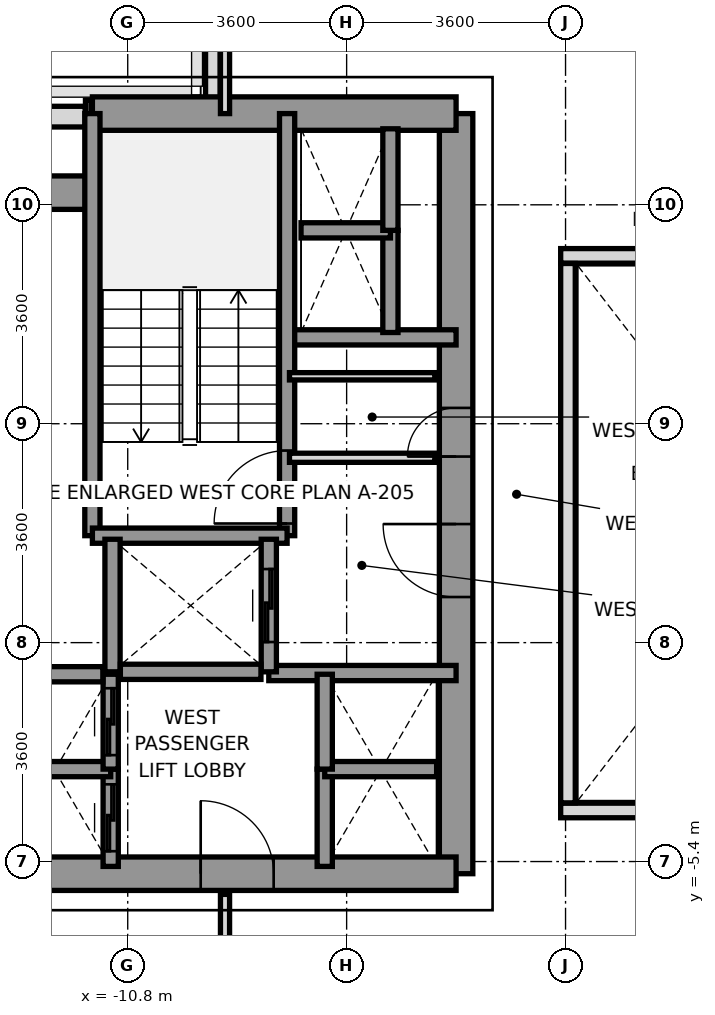
"""IFC4 building model, lengths in metres.
Left out: names, types, materials, properties, quantities, classifications, styles, units other than length and angle.
Written with IfcOpenShell. Run it as: python <this file> out.ifc"""

import sys

from ifc_helpers import new_model, si_unit, direction, frame, frame_2d, origin, place, context, subcontext, project, spatial, rectangle, extrude, source, transform, mapped, element, fill, save


model = new_model("IFC4")
c1 = context("Model", 3, precision=1e-05, world=origin(), true_north=direction((0.0, 1.0)))
c2 = subcontext(c1, "Body", "Model", "MODEL_VIEW")
j1 = project(units=[si_unit("LENGTHUNIT", "METRE"), si_unit("PLANEANGLEUNIT", "RADIAN")], contexts=[c1])
p1 = place(None, origin())
s1 = spatial("IfcSite", under=j1, at=p1, CompositionType="ELEMENT")
p2 = place(p1, origin())
s2 = spatial("IfcBuilding", under=s1, at=p2, CompositionType="ELEMENT")
p3 = place(p2, frame((0.0, 0.0, 54.4)))
s3 = spatial("IfcBuildingStorey", under=s2, at=p3, CompositionType="ELEMENT", Elevation=54.4)
p4 = place(p3, frame((-14.033, 6.85, 0.0), z_axis=(0.0, 0.0, 1.0), x_axis=(1.0, 0.0, 0.0)))
e1 = element("IfcWall", 1, at=p4, inside=s3, PredefinedType="SOLIDWALL", context=c2, shape_type="SweptSolid", body=[
    extrude(rectangle(XDim=2.535, YDim=0.34, at=frame_2d((1.268, 0.0))), origin(), (0.0, 0.0, 1.0), 3.2),
])
p5 = place(p3, frame((-11.495, 7.0, 0.0), z_axis=(0.0, 0.0, 1.0), x_axis=(1.0, 0.0, 0.0)))
e2 = element("IfcWall", 2, at=p5, inside=s3, PredefinedType="PARAPET", context=c2, shape_type="SweptSolid", body=[
    extrude(rectangle(XDim=0.092, YDim=0.24, at=frame_2d((0.046, 0.0))), origin(), (0.0, 0.0, 1.0), 1.15),
])
p6 = place(p3, frame((-9.4, 6.953, 0.0), z_axis=(0.0, 0.0, 1.0), x_axis=(0.0, 1.0, 0.0)))
e3 = element("IfcWall", 3, at=p6, inside=s3, PredefinedType="PARAPET", context=c2, shape_type="SweptSolid", body=[
    extrude(rectangle(XDim=1.444, YDim=0.24, at=frame_2d((0.722, 0.0))), origin(), (0.0, 0.0, 1.0), 1.15),
])
p7 = place(p3, frame((-5.4, -5.6, 0.0), z_axis=(0.0, 0.0, 1.0), x_axis=(0.0, 1.0, 0.0)))
e4 = element("IfcWall", 4, at=p7, inside=s3, PredefinedType="SHEAR", context=c2, shape_type="SweptSolid", body=[
    extrude(rectangle(XDim=12.5, YDim=0.55, at=frame_2d((6.25, 0.0))), origin(), (0.0, 0.0, 1.0), 3.2),
])
p8 = place(p7, frame((4.55, 0.0, 0.0)))
e5 = element("IfcOpeningElement", 5, at=p8, cuts=e4, PredefinedType="OPENING", context=c2, shape_type="SweptSolid", body=[
    extrude(rectangle(XDim=1.2, YDim=2.2, at=frame_2d((0.6, 1.1))), frame((0.0, 0.285, 0.0), z_axis=(0.0, -1.0, 0.0), x_axis=(1.0, 0.0, 0.0)), (0.0, 0.0, 1.0), 0.57),
])
p9 = place(p7, frame((6.86, 0.0, 0.0)))
e6 = element("IfcOpeningElement", 6, at=p9, cuts=e4, PredefinedType="OPENING", context=c2, shape_type="SweptSolid", body=[
    extrude(rectangle(XDim=0.8, YDim=2.1, at=frame_2d((0.4, 1.05))), frame((0.0, 0.285, 0.0), z_axis=(0.0, -1.0, 0.0), x_axis=(1.0, 0.0, 0.0)), (0.0, 0.0, 1.0), 0.57),
])
p10 = place(p3, frame((-11.381, 6.9, 0.0), z_axis=(0.0, 0.0, 1.0), x_axis=(1.0, 0.0, 0.0)))
e7 = element("IfcWall", 7, at=p10, inside=s3, PredefinedType="SHEAR", context=c2, shape_type="SweptSolid", body=[
    extrude(rectangle(XDim=5.981, YDim=0.55, at=frame_2d((2.991, 0.0))), origin(), (0.0, 0.0, 1.0), 3.2),
])
p11 = place(p3, frame((-13.2, 5.6, 0.0), z_axis=(0.0, 0.0, 1.0), x_axis=(1.0, 0.0, 0.0)))
e8 = element("IfcWall", 8, at=p11, inside=s3, PredefinedType="SHEAR", context=c2, shape_type="SweptSolid", body=[
    extrude(rectangle(XDim=1.819, YDim=0.55, at=frame_2d((0.909, 0.0))), origin(), (0.0, 0.0, 1.0), 3.2),
])
p12 = place(p3, frame((-13.2, -5.6, 0.0), z_axis=(0.0, 0.0, 1.0), x_axis=(1.0, 0.0, 0.0)))
e9 = element("IfcWall", 9, at=p12, inside=s3, PredefinedType="SHEAR", context=c2, shape_type="SweptSolid", body=[
    extrude(rectangle(XDim=7.8, YDim=0.55, at=frame_2d((3.9, 0.0))), origin(), (0.0, 0.0, 1.0), 3.2),
])
p13 = place(p12, frame((3.6, 0.0, 0.0)))
e10 = element("IfcOpeningElement", 10, at=p13, cuts=e9, PredefinedType="OPENING", context=c2, shape_type="SweptSolid", body=[
    extrude(rectangle(XDim=1.2, YDim=2.2, at=frame_2d((0.6, 1.1))), frame((0.0, 0.285, 0.0), z_axis=(0.0, -1.0, 0.0), x_axis=(1.0, 0.0, 0.0)), (0.0, 0.0, 1.0), 0.57),
])
p14 = place(p3, frame((-8.18, 3.22, 0.0), z_axis=(0.0, 0.0, 1.0), x_axis=(1.0, 0.0, 0.0)))
e11 = element("IfcWall", 11, at=p14, inside=s3, PredefinedType="SOLIDWALL", context=c2, shape_type="SweptSolid", body=[
    extrude(rectangle(XDim=2.78, YDim=0.25, at=frame_2d((1.39, 0.0))), origin(), (0.0, 0.0, 1.0), 3.2),
])
p15 = place(p3, frame((-8.48, -2.3, 0.0), z_axis=(0.0, 0.0, 1.0), x_axis=(1.0, 0.0, 0.0)))
e12 = element("IfcWall", 12, at=p15, inside=s3, PredefinedType="SOLIDWALL", context=c2, shape_type="SweptSolid", body=[
    extrude(rectangle(XDim=3.08, YDim=0.25, at=frame_2d((1.54, 0.0))), origin(), (0.0, 0.0, 1.0), 3.2),
])
p16 = place(p3, frame((-8.179, -0.041, 0.0), z_axis=(0.0, 0.0, 1.0), x_axis=(0.0, 1.0, 0.0)))
e13 = element("IfcWall", 13, at=p16, inside=s3, PredefinedType="SOLIDWALL", context=c2, shape_type="SweptSolid", body=[
    extrude(rectangle(XDim=6.941, YDim=0.25, at=frame_2d((3.47, 0.0))), origin(), (0.0, 0.0, 1.0), 3.2),
])
p17 = place(p16, frame((0.2, 0.0, 0.0)))
e14 = element("IfcOpeningElement", 14, at=p17, cuts=e13, PredefinedType="OPENING", context=c2, shape_type="SweptSolid", body=[
    extrude(rectangle(XDim=1.2, YDim=2.2, at=frame_2d((0.6, 1.1))), frame((0.0, 0.135, 0.0), z_axis=(0.0, -1.0, 0.0), x_axis=(1.0, 0.0, 0.0)), (0.0, 0.0, 1.0), 0.27),
])
p18 = place(p3, frame((-11.381, -0.041, 0.0), z_axis=(0.0, 0.0, 1.0), x_axis=(0.0, 1.0, 0.0)))
e15 = element("IfcWall", 15, at=p18, inside=s3, PredefinedType="SOLIDWALL", context=c2, shape_type="SweptSolid", body=[
    extrude(rectangle(XDim=6.941, YDim=0.25, at=frame_2d((3.47, 0.0))), origin(), (0.0, 0.0, 1.0), 3.2),
])
p19 = place(p3, frame((-11.381, -0.041, 0.0), z_axis=(0.0, 0.0, 1.0), x_axis=(1.0, 0.0, 0.0)))
e16 = element("IfcWall", 16, at=p19, inside=s3, PredefinedType="SOLIDWALL", context=c2, shape_type="SweptSolid", body=[
    extrude(rectangle(XDim=3.202, YDim=0.25, at=frame_2d((1.601, 0.0))), origin(), (0.0, 0.0, 1.0), 3.2),
])
p20 = place(p3, frame((-11.05, -2.28, 0.0), z_axis=(0.0, 0.0, 1.0), x_axis=(0.0, 1.0, 0.0)))
e17 = element("IfcWall", 17, at=p20, inside=s3, PredefinedType="SOLIDWALL", context=c2, shape_type="SweptSolid", body=[
    extrude(rectangle(XDim=2.18, YDim=0.25, at=frame_2d((1.09, 0.0))), origin(), (0.0, 0.0, 1.0), 3.2),
])
p21 = place(p3, frame((-8.48, -2.28, 0.0), z_axis=(0.0, 0.0, 1.0), x_axis=(0.0, 1.0, 0.0)))
e18 = element("IfcWall", 18, at=p21, inside=s3, PredefinedType="SOLIDWALL", context=c2, shape_type="SweptSolid", body=[
    extrude(rectangle(XDim=2.18, YDim=0.25, at=frame_2d((1.09, 0.0))), origin(), (0.0, 0.0, 1.0), 3.2),
])
p22 = place(p21, frame((0.49, 0.0, 0.0)))
e19 = element("IfcOpeningElement", 19, at=p22, cuts=e18, PredefinedType="OPENING", context=c2, shape_type="SweptSolid", body=[
    extrude(rectangle(XDim=1.2, YDim=2.2, at=frame_2d((0.6, 1.1))), frame((0.0, 0.135, 0.0), z_axis=(0.0, -1.0, 0.0), x_axis=(1.0, 0.0, 0.0)), (0.0, 0.0, 1.0), 0.27),
])
p23 = place(p3, frame((-10.921, -2.28, 0.0), z_axis=(0.0, 0.0, 1.0), x_axis=(1.0, 0.0, 0.0)))
e20 = element("IfcWall", 20, at=p23, inside=s3, PredefinedType="SOLIDWALL", context=c2, shape_type="SweptSolid", body=[
    extrude(rectangle(XDim=2.312, YDim=0.25, at=frame_2d((1.156, 0.0))), origin(), (0.0, 0.0, 1.0), 3.2),
])
p24 = place(p3, frame((-11.08, -5.48, 0.0), z_axis=(0.0, 0.0, 1.0), x_axis=(0.0, 1.0, 0.0)))
e21 = element("IfcWall", 21, at=p24, inside=s3, PredefinedType="SOLIDWALL", context=c2, shape_type="SweptSolid", body=[
    extrude(rectangle(XDim=1.6, YDim=0.25, at=frame_2d((0.8, 0.0))), origin(), (0.0, 0.0, 1.0), 3.2),
])
p25 = place(p24, frame((0.25, 0.0, 0.0)))
e22 = element("IfcOpeningElement", 22, at=p25, cuts=e21, PredefinedType="OPENING", context=c2, shape_type="SweptSolid", body=[
    extrude(rectangle(XDim=1.1, YDim=2.2, at=frame_2d((0.55, 1.1))), frame((0.0, 0.135, 0.0), z_axis=(0.0, -1.0, 0.0), x_axis=(1.0, 0.0, 0.0)), (0.0, 0.0, 1.0), 0.27),
])
p26 = place(p3, frame((-12.92, -3.88, 0.0), z_axis=(0.0, 0.0, 1.0), x_axis=(1.0, 0.0, 0.0)))
e23 = element("IfcWall", 23, at=p26, inside=s3, PredefinedType="SOLIDWALL", context=c2, shape_type="SweptSolid", body=[
    extrude(rectangle(XDim=1.84, YDim=0.25, at=frame_2d((0.92, 0.0))), origin(), (0.0, 0.0, 1.0), 3.2),
])
p27 = place(p3, frame((-11.08, -3.88, 0.0), z_axis=(0.0, 0.0, 1.0), x_axis=(0.0, 1.0, 0.0)))
e24 = element("IfcWall", 24, at=p27, inside=s3, PredefinedType="SOLIDWALL", context=c2, shape_type="SweptSolid", body=[
    extrude(rectangle(XDim=1.56, YDim=0.25, at=frame_2d((0.78, 0.0))), origin(), (0.0, 0.0, 1.0), 3.2),
])
p28 = place(p27, frame((0.23, 0.0, 0.0)))
e25 = element("IfcOpeningElement", 25, at=p28, cuts=e24, PredefinedType="OPENING", context=c2, shape_type="SweptSolid", body=[
    extrude(rectangle(XDim=1.1, YDim=2.2, at=frame_2d((0.55, 1.1))), frame((0.0, 0.135, 0.0), z_axis=(0.0, -1.0, 0.0), x_axis=(1.0, 0.0, 0.0)), (0.0, 0.0, 1.0), 0.27),
])
p29 = place(p3, frame((-12.791, -2.32, 0.0), z_axis=(0.0, 0.0, 1.0), x_axis=(1.0, 0.0, 0.0)))
e26 = element("IfcWall", 26, at=p29, inside=s3, PredefinedType="SOLIDWALL", context=c2, shape_type="SweptSolid", body=[
    extrude(rectangle(XDim=1.582, YDim=0.25, at=frame_2d((0.791, 0.0))), origin(), (0.0, 0.0, 1.0), 3.2),
])
p30 = place(p3, frame((-7.56, -5.48, 0.0), z_axis=(0.0, 0.0, 1.0), x_axis=(0.0, 1.0, 0.0)))
e27 = element("IfcWall", 27, at=p30, inside=s3, PredefinedType="SOLIDWALL", context=c2, shape_type="SweptSolid", body=[
    extrude(rectangle(XDim=1.6, YDim=0.25, at=frame_2d((0.8, 0.0))), origin(), (0.0, 0.0, 1.0), 3.2),
])
p31 = place(p3, frame((-7.56, -3.88, 0.0), z_axis=(0.0, 0.0, 1.0), x_axis=(1.0, 0.0, 0.0)))
e28 = element("IfcWall", 28, at=p31, inside=s3, PredefinedType="SOLIDWALL", context=c2, shape_type="SweptSolid", body=[
    extrude(rectangle(XDim=1.84, YDim=0.25, at=frame_2d((0.92, 0.0))), origin(), (0.0, 0.0, 1.0), 3.2),
])
p32 = place(p3, frame((-7.56, -3.88, 0.0), z_axis=(0.0, 0.0, 1.0), x_axis=(0.0, 1.0, 0.0)))
e29 = element("IfcWall", 29, at=p32, inside=s3, PredefinedType="SOLIDWALL", context=c2, shape_type="SweptSolid", body=[
    extrude(rectangle(XDim=1.56, YDim=0.25, at=frame_2d((0.78, 0.0))), origin(), (0.0, 0.0, 1.0), 3.2),
])
p33 = place(p3, frame((-6.48, 3.3, 0.0), z_axis=(0.0, 0.0, 1.0), x_axis=(0.0, 1.0, 0.0)))
e30 = element("IfcWall", 30, at=p33, inside=s3, PredefinedType="SOLIDWALL", context=c2, shape_type="SweptSolid", body=[
    extrude(rectangle(XDim=1.68, YDim=0.25, at=frame_2d((0.84, 0.0))), origin(), (0.0, 0.0, 1.0), 3.2),
])
p34 = place(p3, frame((-7.95, 4.98, 0.0), z_axis=(0.0, 0.0, 1.0), x_axis=(1.0, 0.0, 0.0)))
e31 = element("IfcWall", 31, at=p34, inside=s3, PredefinedType="SOLIDWALL", context=c2, shape_type="SweptSolid", body=[
    extrude(rectangle(XDim=1.47, YDim=0.25, at=frame_2d((0.735, 0.0))), origin(), (0.0, 0.0, 1.0), 3.2),
])
p35 = place(p3, frame((-6.48, 4.98, 0.0), z_axis=(0.0, 0.0, 1.0), x_axis=(0.0, 1.0, 0.0)))
e32 = element("IfcWall", 32, at=p35, inside=s3, PredefinedType="SOLIDWALL", context=c2, shape_type="SweptSolid", body=[
    extrude(rectangle(XDim=1.67, YDim=0.25, at=frame_2d((0.835, 0.0))), origin(), (0.0, 0.0, 1.0), 3.2),
])
p36 = place(p3, frame((-8.14, 1.24, 0.0), z_axis=(0.0, 0.0, 1.0), x_axis=(1.0, 0.0, 0.0)))
e33 = element("IfcWall", 33, at=p36, inside=s3, PredefinedType="PARTITIONING", context=c2, shape_type="SweptSolid", body=[
    extrude(rectangle(XDim=2.39, YDim=0.15, at=frame_2d((1.195, 0.0))), origin(), (0.0, 0.0, 1.0), 2.3),
])
p37 = place(p3, frame((-8.14, 2.58, 0.0), z_axis=(0.0, 0.0, 1.0), x_axis=(1.0, 0.0, 0.0)))
e34 = element("IfcWall", 34, at=p37, inside=s3, PredefinedType="PARTITIONING", context=c2, shape_type="SweptSolid", body=[
    extrude(rectangle(XDim=2.39, YDim=0.12, at=frame_2d((1.195, 0.0))), origin(), (0.0, 0.0, 1.0), 2.3),
])
p38 = place(p3, frame((-9.2, 6.9, 0.0), z_axis=(0.0, 0.0, 1.0), x_axis=(0.0, 1.0, 0.0)))
e35 = element("IfcWall", 35, at=p38, inside=s3, PredefinedType="PARTITIONING", context=c2, shape_type="SweptSolid", body=[
    extrude(rectangle(XDim=8.78, YDim=0.15, at=frame_2d((4.39, 0.0))), origin(), (0.0, 0.0, 1.0), 2.71),
])
p39 = place(p3, frame((-9.2, -15.68, 0.0), z_axis=(0.0, 0.0, 1.0), x_axis=(0.0, 1.0, 0.0)))
e36 = element("IfcWall", 36, at=p39, inside=s3, PredefinedType="PARTITIONING", context=c2, shape_type="SweptSolid", body=[
    extrude(rectangle(XDim=9.74, YDim=0.15, at=frame_2d((4.87, 0.0))), origin(), (0.0, 0.0, 1.0), 2.71),
])
for number, where, z_axis, x_axis in (
    (37, (-3.68, -4.56, 0.0), (0.0, 0.0, 1.0), (1.0, 0.0, 0.0)),
    (38, (-3.68, 4.56, 0.0), (0.0, 0.0, 1.0), (1.0, 0.0, 0.0)),
):
    element("IfcWall", number, at=place(p3, frame(where, z_axis=z_axis, x_axis=x_axis)), inside=s3, PredefinedType="PARAPET", context=c2, shape_type="SweptSolid", body=[
        extrude(rectangle(XDim=7.36, YDim=0.24, at=frame_2d((3.68, 0.0))), origin(), (0.0, 0.0, 1.0), 1.15),
    ])
p40 = place(p3, frame((-3.56, -4.435, 0.0), z_axis=(0.0, 0.0, 1.0), x_axis=(0.0, 1.0, 0.0)))
e39 = element("IfcWall", 39, at=p40, inside=s3, PredefinedType="PARAPET", context=c2, shape_type="SweptSolid", body=[
    extrude(rectangle(XDim=8.87, YDim=0.24, at=frame_2d((4.435, 0.0))), origin(), (0.0, 0.0, 1.0), 1.15),
])
m1 = source(origin(), c2, "Body", "SweptSolid", [
    extrude(rectangle(XDim=1.2, YDim=2.2, at=frame_2d((0.6, 1.1))), frame((0.0, 0.025, 0.0), z_axis=(0.0, -1.0, 0.0), x_axis=(1.0, 0.0, 0.0)), (0.0, 0.0, 1.0), 0.05),
])
p41 = place(p17, origin())
e40 = element("IfcDoor", 40, at=p41, inside=s3, OperationType="SINGLE_SWING_LEFT", PredefinedType="DOOR", context=c2, shape_type="MappedRepresentation", body=[
    mapped(m1, transform((0.0, 0.0, 0.0), x_axis=(1.0, 0.0, 0.0), y_axis=(0.0, 1.0, 0.0), z_axis=(0.0, 0.0, 1.0), scale=1.0)),
])
fill(e14, e40)
p42 = place(p8, origin())
e41 = element("IfcDoor", 41, at=p42, inside=s3, OperationType="SINGLE_SWING_RIGHT", PredefinedType="DOOR", context=c2, shape_type="MappedRepresentation", body=[
    mapped(m1, transform((0.0, 0.0, 0.0), x_axis=(1.0, 0.0, 0.0), y_axis=(0.0, 1.0, 0.0), z_axis=(0.0, 0.0, 1.0), scale=1.0)),
])
fill(e5, e41)
p43 = place(p13, origin())
e42 = element("IfcDoor", 42, at=p43, inside=s3, OperationType="SINGLE_SWING_LEFT", PredefinedType="DOOR", context=c2, shape_type="MappedRepresentation", body=[
    mapped(m1, transform((0.0, 0.0, 0.0), x_axis=(1.0, 0.0, 0.0), y_axis=(0.0, 1.0, 0.0), z_axis=(0.0, 0.0, 1.0), scale=1.0)),
])
fill(e10, e42)
m2 = source(origin(), c2, "Body", "SweptSolid", [
    extrude(rectangle(XDim=0.8, YDim=2.1, at=frame_2d((0.4, 1.05))), frame((0.0, 0.025, 0.0), z_axis=(0.0, -1.0, 0.0), x_axis=(1.0, 0.0, 0.0)), (0.0, 0.0, 1.0), 0.05),
])
p44 = place(p9, origin())
e43 = element("IfcDoor", 43, at=p44, inside=s3, OperationType="SINGLE_SWING_LEFT", PredefinedType="DOOR", context=c2, shape_type="MappedRepresentation", body=[
    mapped(m2, transform((0.0, 0.0, 0.0), x_axis=(1.0, 0.0, 0.0), y_axis=(0.0, 1.0, 0.0), z_axis=(0.0, 0.0, 1.0), scale=1.0)),
])
fill(e6, e43)
p45 = place(p22, origin())
e44 = element("IfcDoor", 44, at=p45, inside=s3, OperationType="SLIDING_TO_RIGHT", PredefinedType="DOOR", context=c2, shape_type="MappedRepresentation", body=[
    mapped(m1, transform((0.0, 0.0, 0.0), x_axis=(1.0, 0.0, 0.0), y_axis=(0.0, 1.0, 0.0), z_axis=(0.0, 0.0, 1.0), scale=1.0)),
])
fill(e19, e44)
m3 = source(origin(), c2, "Body", "SweptSolid", [
    extrude(rectangle(XDim=1.1, YDim=2.2, at=frame_2d((0.55, 1.1))), frame((0.0, 0.025, 0.0), z_axis=(0.0, -1.0, 0.0), x_axis=(1.0, 0.0, 0.0)), (0.0, 0.0, 1.0), 0.05),
])
p46 = place(p25, origin())
e45 = element("IfcDoor", 45, at=p46, inside=s3, OperationType="SLIDING_TO_LEFT", PredefinedType="DOOR", context=c2, shape_type="MappedRepresentation", body=[
    mapped(m3, transform((0.0, 0.0, 0.0), x_axis=(1.0, 0.0, 0.0), y_axis=(0.0, 1.0, 0.0), z_axis=(0.0, 0.0, 1.0), scale=1.0)),
])
fill(e22, e45)
p47 = place(p28, origin())
e46 = element("IfcDoor", 46, at=p47, inside=s3, OperationType="SLIDING_TO_LEFT", PredefinedType="DOOR", context=c2, shape_type="MappedRepresentation", body=[
    mapped(m3, transform((0.0, 0.0, 0.0), x_axis=(1.0, 0.0, 0.0), y_axis=(0.0, 1.0, 0.0), z_axis=(0.0, 0.0, 1.0), scale=1.0)),
])
fill(e25, e46)
save(model, sys.argv[1])
